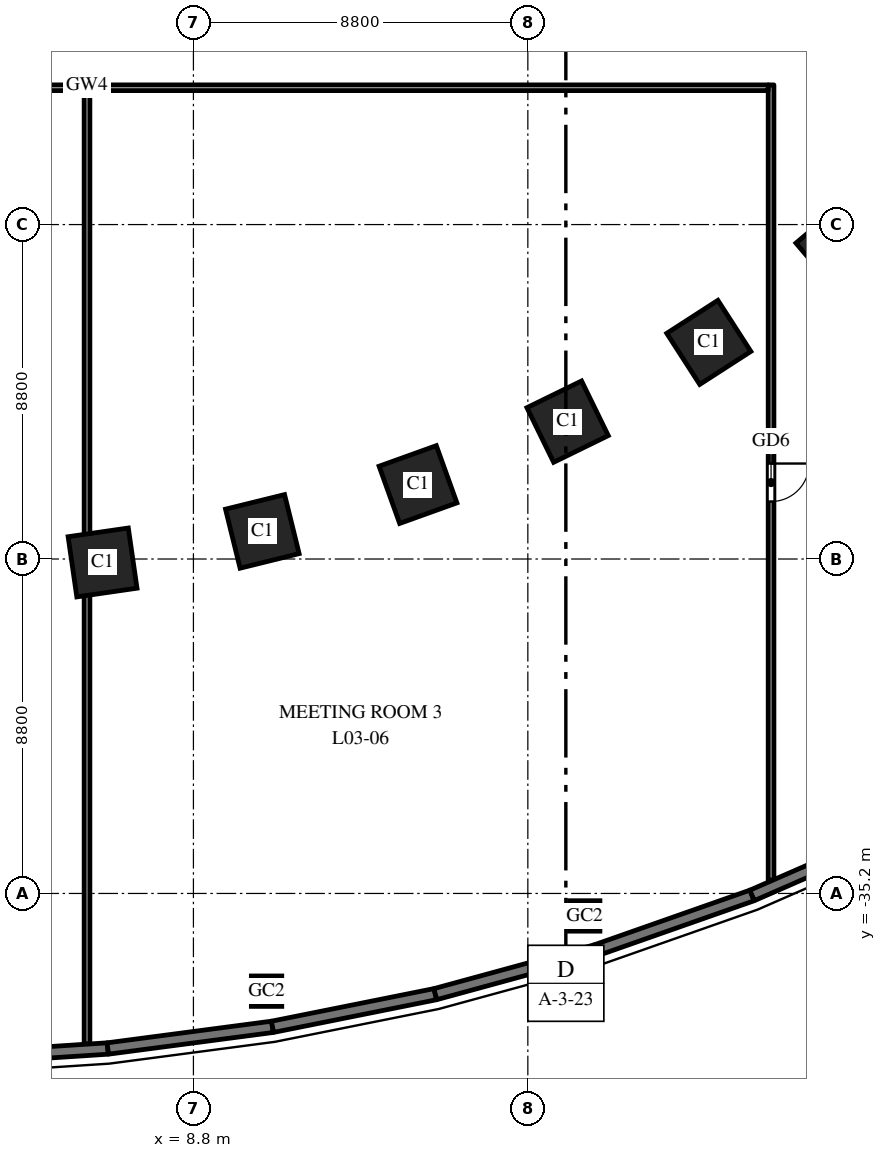
"""IFC4 building model, lengths in metres.
Left out: names, types, materials, properties, quantities, classifications, styles, units other than length and angle.
Written with IfcOpenShell. Run it as: python <this file> out.ifc"""

import sys

from ifc_helpers import new_model, si_unit, direction, frame, frame_2d, origin, origin_2d, place, context, subcontext, project, spatial, rectangle, hollow_rectangle, extrude, element, fill, save


model = new_model("IFC4")
c1 = context("Model", 3, precision=1e-05, world=origin(), true_north=direction((0.0, 1.0)))
c2 = subcontext(c1, "Body", "Model", "MODEL_VIEW")
j1 = project(units=[si_unit("LENGTHUNIT", "METRE"), si_unit("PLANEANGLEUNIT", "RADIAN")], contexts=[c1])
p1 = place(None, origin())
s1 = spatial("IfcSite", under=j1, at=p1, CompositionType="ELEMENT")
p2 = place(p1, origin())
s2 = spatial("IfcBuilding", under=s1, at=p2, CompositionType="ELEMENT")
p3 = place(p2, frame((0.0, 0.0, 19.5)))
s3 = spatial("IfcBuildingStorey", under=s2, at=p3, CompositionType="ELEMENT", Elevation=19.5)
for number, where, z_axis, x_axis in (
    (1, (6.409, -26.491, 0.0), (0.0, 0.0, 1.0), (0.99, 0.143, 0.0)),
    (2, (10.613, -25.674, 0.0), (0.0, 0.0, 1.0), (0.971, 0.24, 0.0)),
    (3, (14.709, -24.441, 0.0), (0.0, 0.0, 1.0), (0.941, 0.338, 0.0)),
    (4, (18.646, -22.785, 0.0), (0.0, 0.0, 1.0), (0.898, 0.439, 0.0)),
    (5, (22.362, -20.7, 0.0), (0.0, 0.0, 1.0), (0.84, 0.542, 0.0)),
    (6, (25.783, -18.18, 0.0), (0.0, 0.0, 1.0), (0.763, 0.646, 0.0)),
):
    element("IfcColumn", number, at=place(p3, frame(where, z_axis=z_axis, x_axis=x_axis)), inside=s3, PredefinedType="COLUMN", context=c2, shape_type="SweptSolid", body=[
        extrude(rectangle(XDim=1.6, YDim=1.6, at=origin_2d()), origin(), (0.0, 0.0, 1.0), 5.5),
    ])
for number, where, z_axis, x_axis in (
    (7, (10.725, -37.771, 0.0), (0.0, 0.0, 1.0), (1.0, 0.0, 0.0)),
    (8, (19.097, -35.792, 0.0), (0.0, 0.0, 1.0), (1.0, 0.0, 0.0)),
):
    element("IfcColumn", number, at=place(p3, frame(where, z_axis=z_axis, x_axis=x_axis)), inside=s3, PredefinedType="COLUMN", context=c2, shape_type="SweptSolid", body=[
        extrude(hollow_rectangle(XDim=0.8, YDim=0.8, WallThickness=0.04, at=origin_2d()), origin(), (0.0, 0.0, 1.0), 5.5),
    ])
p4 = place(p3, frame((6.0, -13.925, 0.0), z_axis=(0.0, 0.0, 1.0), x_axis=(0.0, -1.0, 0.0)))
e9 = element("IfcWall", 9, at=p4, inside=s3, PredefinedType="PARTITIONING", context=c2, shape_type="SweptSolid", body=[
    extrude(rectangle(XDim=25.24, YDim=0.15, at=frame_2d((12.62, 0.0))), origin(), (0.0, 0.0, 1.0), 4.3),
])
p5 = place(p3, frame((-11.925, -14.0, 0.0), z_axis=(0.0, 0.0, 1.0), x_axis=(1.0, 0.0, 0.0)))
e10 = element("IfcWall", 10, at=p5, inside=s3, PredefinedType="PARTITIONING", context=c2, shape_type="SweptSolid", body=[
    extrude(rectangle(XDim=17.85, YDim=0.15, at=frame_2d((8.925, 0.0))), origin(), (0.0, 0.0, 1.0), 4.3),
])
p6 = place(p5, frame((8.425, 0.0, 0.0)))
e11 = element("IfcOpeningElement", 11, at=p6, cuts=e10, PredefinedType="OPENING", context=c2, shape_type="SweptSolid", body=[
    extrude(rectangle(XDim=1.0, YDim=2.1, at=frame_2d((0.5, 1.05))), frame((0.0, 0.085, 0.0), z_axis=(0.0, -1.0, 0.0), x_axis=(1.0, 0.0, 0.0)), (0.0, 0.0, 1.0), 0.17),
])
p7 = place(p3, frame((24.0, -13.925, 0.0), z_axis=(0.0, 0.0, 1.0), x_axis=(0.0, -1.0, 0.0)))
e12 = element("IfcWall", 12, at=p7, inside=s3, PredefinedType="PARTITIONING", context=c2, shape_type="SweptSolid", body=[
    extrude(rectangle(XDim=20.926, YDim=0.15, at=frame_2d((10.463, 0.0))), origin(), (0.0, 0.0, 1.0), 4.25),
])
p8 = place(p7, frame((9.963, 0.0, 0.0)))
e13 = element("IfcOpeningElement", 13, at=p8, cuts=e12, PredefinedType="OPENING", context=c2, shape_type="SweptSolid", body=[
    extrude(rectangle(XDim=1.0, YDim=2.1, at=frame_2d((0.5, 1.05))), frame((0.0, 0.085, 0.0), z_axis=(0.0, -1.0, 0.0), x_axis=(1.0, 0.0, 0.0)), (0.0, 0.0, 1.0), 0.17),
])
p9 = place(p3, frame((6.075, -14.0, 0.0), z_axis=(0.0, 0.0, 1.0), x_axis=(1.0, 0.0, 0.0)))
e14 = element("IfcWall", 14, at=p9, inside=s3, PredefinedType="PARTITIONING", context=c2, shape_type="SweptSolid", body=[
    extrude(rectangle(XDim=17.85, YDim=0.15, at=frame_2d((8.925, 0.0))), origin(), (0.0, 0.0, 1.0), 4.3),
])
p10 = place(p3, frame((2.186, -39.564, 0.0), z_axis=(0.0, 0.0, 1.0), x_axis=(0.997876871627, 0.065128711577, 0.0)))
e15 = element("IfcWall", 15, at=p10, inside=s3, PredefinedType="SOLIDWALL", context=c2, shape_type="SweptSolid", body=[
    extrude(rectangle(XDim=4.371, YDim=0.3, at=frame_2d((2.186, 0.0))), origin(), (0.0, 0.0, 1.0), 5.25),
])
p11 = place(p10, frame((0.985, 0.0, 1.0)))
e16 = element("IfcOpeningElement", 16, at=p11, cuts=e15, PredefinedType="OPENING", context=c2, shape_type="SweptSolid", body=[
    extrude(rectangle(XDim=2.4, YDim=3.0, at=frame_2d((1.2, 1.5))), frame((0.0, 0.16, 0.0), z_axis=(0.0, -1.0, 0.0), x_axis=(1.0, 0.0, 0.0)), (0.0, 0.0, 1.0), 0.32),
])
p12 = place(p3, frame((6.547, -39.28, 0.0), z_axis=(0.0, 0.0, 1.0), x_axis=(0.991441741932, 0.130549884544, 0.0)))
e17 = element("IfcWall", 17, at=p12, inside=s3, PredefinedType="SOLIDWALL", context=c2, shape_type="SweptSolid", body=[
    extrude(rectangle(XDim=4.37, YDim=0.3, at=frame_2d((2.185, 0.0))), origin(), (0.0, 0.0, 1.0), 5.25),
])
p13 = place(p12, frame((0.985, 0.0, 1.0)))
e18 = element("IfcOpeningElement", 18, at=p13, cuts=e17, PredefinedType="OPENING", context=c2, shape_type="SweptSolid", body=[
    extrude(rectangle(XDim=2.4, YDim=3.0, at=frame_2d((1.2, 1.5))), frame((0.0, 0.16, 0.0), z_axis=(0.0, -1.0, 0.0), x_axis=(1.0, 0.0, 0.0)), (0.0, 0.0, 1.0), 0.32),
])
p14 = place(p3, frame((10.88, -38.709, 0.0), z_axis=(0.0, 0.0, 1.0), x_axis=(0.980494629762, 0.196545875071, 0.0)))
e19 = element("IfcWall", 19, at=p14, inside=s3, PredefinedType="SOLIDWALL", context=c2, shape_type="SweptSolid", body=[
    extrude(rectangle(XDim=4.37, YDim=0.3, at=frame_2d((2.185, 0.0))), origin(), (0.0, 0.0, 1.0), 5.25),
])
p15 = place(p14, frame((0.985, 0.0, 1.0)))
e20 = element("IfcOpeningElement", 20, at=p15, cuts=e19, PredefinedType="OPENING", context=c2, shape_type="SweptSolid", body=[
    extrude(rectangle(XDim=2.4, YDim=3.0, at=frame_2d((1.2, 1.5))), frame((0.0, 0.16, 0.0), z_axis=(0.0, -1.0, 0.0), x_axis=(1.0, 0.0, 0.0)), (0.0, 0.0, 1.0), 0.32),
])
p16 = place(p3, frame((15.165, -37.85, 0.0), z_axis=(0.0, 0.0, 1.0), x_axis=(0.964679950239, 0.263424739931, 0.0)))
e21 = element("IfcWall", 21, at=p16, inside=s3, PredefinedType="SOLIDWALL", context=c2, shape_type="SweptSolid", body=[
    extrude(rectangle(XDim=4.369, YDim=0.3, at=frame_2d((2.185, 0.0))), origin(), (0.0, 0.0, 1.0), 5.25),
])
p17 = place(p16, frame((0.985, 0.0, 1.0)))
e22 = element("IfcOpeningElement", 22, at=p17, cuts=e21, PredefinedType="OPENING", context=c2, shape_type="SweptSolid", body=[
    extrude(rectangle(XDim=2.4, YDim=3.0, at=frame_2d((1.2, 1.5))), frame((0.0, 0.16, 0.0), z_axis=(0.0, -1.0, 0.0), x_axis=(1.0, 0.0, 0.0)), (0.0, 0.0, 1.0), 0.32),
])
p18 = place(p3, frame((19.379, -36.699, 0.0), z_axis=(0.0, 0.0, 1.0), x_axis=(0.943526738033, 0.331296384853, 0.0)))
e23 = element("IfcWall", 23, at=p18, inside=s3, PredefinedType="SOLIDWALL", context=c2, shape_type="SweptSolid", body=[
    extrude(rectangle(XDim=4.368, YDim=0.3, at=frame_2d((2.184, 0.0))), origin(), (0.0, 0.0, 1.0), 5.25),
])
p19 = place(p18, frame((0.984, 0.0, 1.0)))
e24 = element("IfcOpeningElement", 24, at=p19, cuts=e23, PredefinedType="OPENING", context=c2, shape_type="SweptSolid", body=[
    extrude(rectangle(XDim=2.4, YDim=3.0, at=frame_2d((1.2, 1.5))), frame((0.0, 0.16, 0.0), z_axis=(0.0, -1.0, 0.0), x_axis=(1.0, 0.0, 0.0)), (0.0, 0.0, 1.0), 0.32),
])
p20 = place(p3, frame((23.5, -35.252, 0.0), z_axis=(0.0, 0.0, 1.0), x_axis=(0.916336904548, 0.400408138483, 0.0)))
e25 = element("IfcWall", 25, at=p20, inside=s3, PredefinedType="SOLIDWALL", context=c2, shape_type="SweptSolid", body=[
    extrude(rectangle(XDim=4.366, YDim=0.3, at=frame_2d((2.183, 0.0))), origin(), (0.0, 0.0, 1.0), 5.25),
])
p21 = place(p20, frame((0.983, 0.0, 1.0)))
e26 = element("IfcOpeningElement", 26, at=p21, cuts=e25, PredefinedType="OPENING", context=c2, shape_type="SweptSolid", body=[
    extrude(rectangle(XDim=2.4, YDim=3.0, at=frame_2d((1.2, 1.5))), frame((0.0, 0.16, 0.0), z_axis=(0.0, -1.0, 0.0), x_axis=(1.0, 0.0, 0.0)), (0.0, 0.0, 1.0), 0.32),
])
p22 = place(p8, origin())
e27 = element("IfcDoor", 27, at=p22, inside=s3, OperationType="SINGLE_SWING_LEFT", PredefinedType="DOOR", context=c2, shape_type="SweptSolid", body=[
    extrude(rectangle(XDim=1.0, YDim=2.1, at=frame_2d((0.5, 1.05))), frame((0.0, 0.025, 0.0), z_axis=(0.0, -1.0, 0.0), x_axis=(1.0, 0.0, 0.0)), (0.0, 0.0, 1.0), 0.05),
])
fill(e13, e27)
p23 = place(p11, origin())
e28 = element("IfcWindow", 28, at=p23, inside=s3, PartitioningType="SINGLE_PANEL", PredefinedType="WINDOW", context=c2, shape_type="SweptSolid", body=[
    extrude(rectangle(XDim=2.4, YDim=3.0, at=frame_2d((1.2, 1.5))), frame((0.0, 0.03, 0.0), z_axis=(0.0, -1.0, 0.0), x_axis=(1.0, 0.0, 0.0)), (0.0, 0.0, 1.0), 0.06),
])
fill(e16, e28)
p24 = place(p13, origin())
e29 = element("IfcWindow", 29, at=p24, inside=s3, PartitioningType="SINGLE_PANEL", PredefinedType="WINDOW", context=c2, shape_type="SweptSolid", body=[
    extrude(rectangle(XDim=2.4, YDim=3.0, at=frame_2d((1.2, 1.5))), frame((0.0, 0.03, 0.0), z_axis=(0.0, -1.0, 0.0), x_axis=(1.0, 0.0, 0.0)), (0.0, 0.0, 1.0), 0.06),
])
fill(e18, e29)
p25 = place(p15, origin())
e30 = element("IfcWindow", 30, at=p25, inside=s3, PartitioningType="SINGLE_PANEL", PredefinedType="WINDOW", context=c2, shape_type="SweptSolid", body=[
    extrude(rectangle(XDim=2.4, YDim=3.0, at=frame_2d((1.2, 1.5))), frame((0.0, 0.03, 0.0), z_axis=(0.0, -1.0, 0.0), x_axis=(1.0, 0.0, 0.0)), (0.0, 0.0, 1.0), 0.06),
])
fill(e20, e30)
p26 = place(p17, origin())
e31 = element("IfcWindow", 31, at=p26, inside=s3, PartitioningType="SINGLE_PANEL", PredefinedType="WINDOW", context=c2, shape_type="SweptSolid", body=[
    extrude(rectangle(XDim=2.4, YDim=3.0, at=frame_2d((1.2, 1.5))), frame((0.0, 0.03, 0.0), z_axis=(0.0, -1.0, 0.0), x_axis=(1.0, 0.0, 0.0)), (0.0, 0.0, 1.0), 0.06),
])
fill(e22, e31)
p27 = place(p19, origin())
e32 = element("IfcWindow", 32, at=p27, inside=s3, PartitioningType="SINGLE_PANEL", PredefinedType="WINDOW", context=c2, shape_type="SweptSolid", body=[
    extrude(rectangle(XDim=2.4, YDim=3.0, at=frame_2d((1.2, 1.5))), frame((0.0, 0.03, 0.0), z_axis=(0.0, -1.0, 0.0), x_axis=(1.0, 0.0, 0.0)), (0.0, 0.0, 1.0), 0.06),
])
fill(e24, e32)
p28 = place(p21, origin())
e33 = element("IfcWindow", 33, at=p28, inside=s3, PartitioningType="SINGLE_PANEL", PredefinedType="WINDOW", context=c2, shape_type="SweptSolid", body=[
    extrude(rectangle(XDim=2.4, YDim=3.0, at=frame_2d((1.2, 1.5))), frame((0.0, 0.03, 0.0), z_axis=(0.0, -1.0, 0.0), x_axis=(1.0, 0.0, 0.0)), (0.0, 0.0, 1.0), 0.06),
])
fill(e26, e33)
save(model, sys.argv[1])
